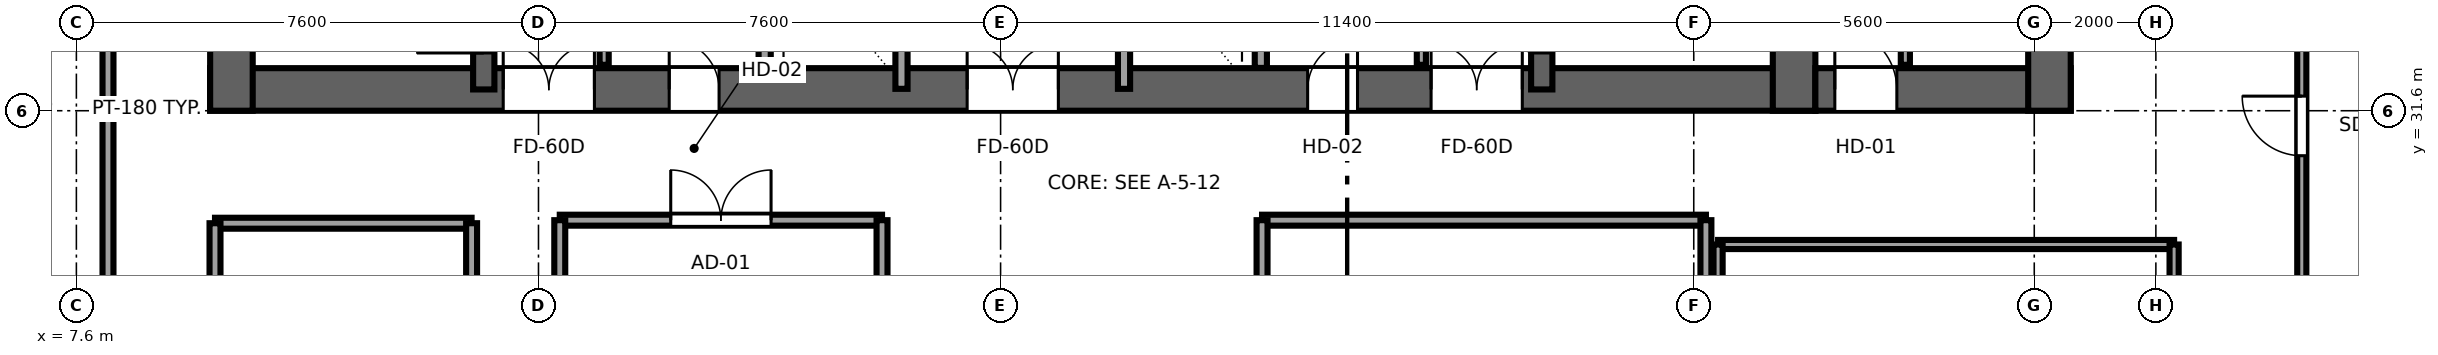
"""IFC4 building model, lengths in metres.
Left out: names, types, materials, properties, quantities, classifications, styles, units other than length and angle.
Written with IfcOpenShell. Run it as: python <this file> out.ifc"""

import sys

from ifc_helpers import new_model, si_unit, direction, frame, frame_2d, origin, place, context, subcontext, project, spatial, rectangle, extrude, source, transform, mapped, element, fill, save


model = new_model("IFC4")
c1 = context("Model", 3, precision=1e-05, world=origin(), true_north=direction((0.0, 1.0)))
c2 = subcontext(c1, "Body", "Model", "MODEL_VIEW")
j1 = project(units=[si_unit("LENGTHUNIT", "METRE"), si_unit("PLANEANGLEUNIT", "RADIAN")], contexts=[c1])
p1 = place(None, origin())
s1 = spatial("IfcSite", under=j1, at=p1, CompositionType="ELEMENT")
p2 = place(p1, origin())
s2 = spatial("IfcBuilding", under=s1, at=p2, CompositionType="ELEMENT")
p3 = place(p2, frame((0.0, 0.0, 147.05)))
s3 = spatial("IfcBuildingStorey", under=s2, at=p3, CompositionType="ELEMENT", Elevation=147.05)
p4 = place(p3, frame((9.8, 31.95, 0.0), z_axis=(0.0, 0.0, 1.0), x_axis=(1.0, 0.0, 0.0)))
e1 = element("IfcWall", 1, at=p4, inside=s3, PredefinedType="SHEAR", context=c2, shape_type="SweptSolid", body=[
    extrude(rectangle(XDim=26.4, YDim=0.7, at=frame_2d((13.2, 0.0))), origin(), (0.0, 0.0, 1.0), 3.55),
])
p5 = place(p4, frame((6.32, 0.0, 0.0), z_axis=(0.0, 0.0, 1.0), x_axis=(-1.0, 0.0, 0.0)))
e2 = element("IfcOpeningElement", 2, at=p5, cuts=e1, PredefinedType="OPENING", context=c2, shape_type="SweptSolid", body=[
    extrude(rectangle(XDim=1.5, YDim=2.04, at=frame_2d((0.75, 1.02))), frame((0.0, 0.36, 0.0), z_axis=(0.0, -1.0, 0.0), x_axis=(1.0, 0.0, 0.0)), (0.0, 0.0, 1.0), 0.72),
])
p6 = place(p4, frame((13.95, 0.0, 0.0), z_axis=(0.0, 0.0, 1.0), x_axis=(-1.0, 0.0, 0.0)))
e3 = element("IfcOpeningElement", 3, at=p6, cuts=e1, PredefinedType="OPENING", context=c2, shape_type="SweptSolid", body=[
    extrude(rectangle(XDim=1.5, YDim=2.04, at=frame_2d((0.75, 1.02))), frame((0.0, 0.36, 0.0), z_axis=(0.0, -1.0, 0.0), x_axis=(1.0, 0.0, 0.0)), (0.0, 0.0, 1.0), 0.72),
])
p7 = place(p4, frame((21.58, 0.0, 0.0), z_axis=(0.0, 0.0, 1.0), x_axis=(-1.0, 0.0, 0.0)))
e4 = element("IfcOpeningElement", 4, at=p7, cuts=e1, PredefinedType="OPENING", context=c2, shape_type="SweptSolid", body=[
    extrude(rectangle(XDim=1.5, YDim=2.04, at=frame_2d((0.75, 1.02))), frame((0.0, 0.36, 0.0), z_axis=(0.0, -1.0, 0.0), x_axis=(1.0, 0.0, 0.0)), (0.0, 0.0, 1.0), 0.72),
])
p8 = place(p4, frame((8.37, 0.0, 0.0), z_axis=(0.0, 0.0, 1.0), x_axis=(-1.0, 0.0, 0.0)))
e5 = element("IfcOpeningElement", 5, at=p8, cuts=e1, PredefinedType="OPENING", context=c2, shape_type="SweptSolid", body=[
    extrude(rectangle(XDim=0.82, YDim=2.01, at=frame_2d((0.41, 1.005))), frame((0.0, 0.36, 0.0), z_axis=(0.0, -1.0, 0.0), x_axis=(1.0, 0.0, 0.0)), (0.0, 0.0, 1.0), 0.72),
])
p9 = place(p4, frame((18.87, 0.0, 0.0), z_axis=(0.0, 0.0, 1.0), x_axis=(-1.0, 0.0, 0.0)))
e6 = element("IfcOpeningElement", 6, at=p9, cuts=e1, PredefinedType="OPENING", context=c2, shape_type="SweptSolid", body=[
    extrude(rectangle(XDim=0.82, YDim=2.01, at=frame_2d((0.41, 1.005))), frame((0.0, 0.36, 0.0), z_axis=(0.0, -1.0, 0.0), x_axis=(1.0, 0.0, 0.0)), (0.0, 0.0, 1.0), 0.72),
])
for number, where, z_axis, x_axis in (
    (7, (10.15, 31.6, 0.0), (0.0, 0.0, 1.0), (0.0, 1.0, 0.0)),
    (8, (35.85, 31.6, 0.0), (0.0, 0.0, 1.0), (0.0, 1.0, 0.0)),
):
    element("IfcWall", number, at=place(p3, frame(where, z_axis=z_axis, x_axis=x_axis)), inside=s3, PredefinedType="SHEAR", context=c2, shape_type="SweptSolid", body=[
        extrude(rectangle(XDim=13.6, YDim=0.7, at=frame_2d((6.8, 0.0))), origin(), (0.0, 0.0, 1.0), 3.55),
    ])
p10 = place(p3, frame((14.3, 31.95, 0.0), z_axis=(0.0, 0.0, 1.0), x_axis=(0.0, 1.0, 0.0)))
e9 = element("IfcWall", 9, at=p10, inside=s3, PredefinedType="SHEAR", context=c2, shape_type="SweptSolid", body=[
    extrude(rectangle(XDim=12.9, YDim=0.35, at=frame_2d((6.45, 0.0))), origin(), (0.0, 0.0, 1.0), 3.55),
])
p11 = place(p10, frame((0.6, 0.0, 0.0)))
e10 = element("IfcOpeningElement", 10, at=p11, cuts=e9, PredefinedType="OPENING", context=c2, shape_type="SweptSolid", body=[
    extrude(rectangle(XDim=1.1, YDim=2.12, at=frame_2d((0.55, 1.06))), frame((0.0, 0.185, 0.0), z_axis=(0.0, -1.0, 0.0), x_axis=(1.0, 0.0, 0.0)), (0.0, 0.0, 1.0), 0.37),
])
p12 = place(p3, frame((31.7, 31.95, 0.0), z_axis=(0.0, 0.0, 1.0), x_axis=(0.0, 1.0, 0.0)))
e11 = element("IfcWall", 11, at=p12, inside=s3, PredefinedType="SHEAR", context=c2, shape_type="SweptSolid", body=[
    extrude(rectangle(XDim=12.9, YDim=0.35, at=frame_2d((6.45, 0.0))), origin(), (0.0, 0.0, 1.0), 3.55),
])
p13 = place(p12, frame((1.7, 0.0, 0.0), z_axis=(0.0, 0.0, 1.0), x_axis=(-1.0, 0.0, 0.0)))
e12 = element("IfcOpeningElement", 12, at=p13, cuts=e11, PredefinedType="OPENING", context=c2, shape_type="SweptSolid", body=[
    extrude(rectangle(XDim=1.1, YDim=2.12, at=frame_2d((0.55, 1.06))), frame((0.0, 0.185, 0.0), z_axis=(0.0, -1.0, 0.0), x_axis=(1.0, 0.0, 0.0)), (0.0, 0.0, 1.0), 0.37),
])
p14 = place(p3, frame((36.2, 31.95, 0.0), z_axis=(0.0, 0.0, 1.0), x_axis=(1.0, 0.0, 0.0)))
e13 = element("IfcWall", 13, at=p14, inside=s3, PredefinedType="SHEAR", context=c2, shape_type="SweptSolid", body=[
    extrude(rectangle(XDim=4.2, YDim=0.7, at=frame_2d((2.1, 0.0))), origin(), (0.0, 0.0, 1.0), 3.55),
])
p15 = place(p14, frame((1.34, 0.0, 0.0), z_axis=(0.0, 0.0, 1.0), x_axis=(-1.0, 0.0, 0.0)))
e14 = element("IfcOpeningElement", 14, at=p15, cuts=e13, PredefinedType="OPENING", context=c2, shape_type="SweptSolid", body=[
    extrude(rectangle(XDim=1.02, YDim=2.03, at=frame_2d((0.51, 1.015))), frame((0.0, 0.36, 0.0), z_axis=(0.0, -1.0, 0.0), x_axis=(1.0, 0.0, 0.0)), (0.0, 0.0, 1.0), 0.72),
])
p16 = place(p3, frame((40.05, 31.6, 0.0), z_axis=(0.0, 0.0, 1.0), x_axis=(0.0, 1.0, 0.0)))
e15 = element("IfcWall", 15, at=p16, inside=s3, PredefinedType="SHEAR", context=c2, shape_type="SweptSolid", body=[
    extrude(rectangle(XDim=13.6, YDim=0.7, at=frame_2d((6.8, 0.0))), origin(), (0.0, 0.0, 1.0), 3.55),
])
for number, where, z_axis, x_axis in (
    (16, (18.92, 32.304, 0.0), (0.0, 0.0, 1.0), (0.0, 1.0, 0.0)),
    (17, (27.08, 32.304, 0.0), (0.0, 0.0, 1.0), (0.0, 1.0, 0.0)),
):
    element("IfcWall", number, at=place(p3, frame(where, z_axis=z_axis, x_axis=x_axis)), inside=s3, PredefinedType="SOLIDWALL", context=c2, shape_type="SweptSolid", body=[
        extrude(rectangle(XDim=3.846, YDim=0.2, at=frame_2d((1.923, 0.0))), origin(), (0.0, 0.0, 1.0), 3.37),
    ])
p17 = place(p3, frame((21.17, 31.96, 0.0), z_axis=(0.0, 0.0, 1.0), x_axis=(0.0, 1.0, 0.0)))
e18 = element("IfcWall", 18, at=p17, inside=s3, PredefinedType="SOLIDWALL", context=c2, shape_type="SweptSolid", body=[
    extrude(rectangle(XDim=12.58, YDim=0.2, at=frame_2d((6.29, 0.0))), origin(), (0.0, 0.0, 1.0), 3.37),
])
p18 = place(p17, frame((5.74, 0.0, 0.0)))
e19 = element("IfcOpeningElement", 19, at=p18, cuts=e18, PredefinedType="OPENING", context=c2, shape_type="SweptSolid", body=[
    extrude(rectangle(XDim=1.1, YDim=2.12, at=frame_2d((0.55, 1.06))), frame((0.0, 0.11, 0.0), z_axis=(0.0, -1.0, 0.0), x_axis=(1.0, 0.0, 0.0)), (0.0, 0.0, 1.0), 0.22),
])
p19 = place(p17, frame((8.24, 0.0, 0.0)))
e20 = element("IfcOpeningElement", 20, at=p19, cuts=e18, PredefinedType="OPENING", context=c2, shape_type="SweptSolid", body=[
    extrude(rectangle(XDim=1.1, YDim=2.12, at=frame_2d((0.55, 1.06))), frame((0.0, 0.11, 0.0), z_axis=(0.0, -1.0, 0.0), x_axis=(1.0, 0.0, 0.0)), (0.0, 0.0, 1.0), 0.22),
])
p20 = place(p3, frame((24.83, 31.96, 0.0), z_axis=(0.0, 0.0, 1.0), x_axis=(0.0, 1.0, 0.0)))
e21 = element("IfcWall", 21, at=p20, inside=s3, PredefinedType="SOLIDWALL", context=c2, shape_type="SweptSolid", body=[
    extrude(rectangle(XDim=12.58, YDim=0.2, at=frame_2d((6.29, 0.0))), origin(), (0.0, 0.0, 1.0), 3.37),
])
p21 = place(p20, frame((5.74, 0.0, 0.0)))
e22 = element("IfcOpeningElement", 22, at=p21, cuts=e21, PredefinedType="OPENING", context=c2, shape_type="SweptSolid", body=[
    extrude(rectangle(XDim=1.1, YDim=2.12, at=frame_2d((0.55, 1.06))), frame((0.0, 0.11, 0.0), z_axis=(0.0, -1.0, 0.0), x_axis=(1.0, 0.0, 0.0)), (0.0, 0.0, 1.0), 0.22),
])
p22 = place(p20, frame((8.24, 0.0, 0.0)))
e23 = element("IfcOpeningElement", 23, at=p22, cuts=e21, PredefinedType="OPENING", context=c2, shape_type="SweptSolid", body=[
    extrude(rectangle(XDim=1.1, YDim=2.12, at=frame_2d((0.55, 1.06))), frame((0.0, 0.11, 0.0), z_axis=(0.0, -1.0, 0.0), x_axis=(1.0, 0.0, 0.0)), (0.0, 0.0, 1.0), 0.22),
])
for number, where, z_axis, x_axis in (
    (24, (16.28, 32.355, 0.0), (0.0, 0.0, 1.0), (0.0, 1.0, 0.0)),
    (25, (29.72, 32.355, 0.0), (0.0, 0.0, 1.0), (0.0, 1.0, 0.0)),
):
    element("IfcWall", number, at=place(p3, frame(where, z_axis=z_axis, x_axis=x_axis)), inside=s3, PredefinedType="PARTITIONING", context=c2, shape_type="SweptSolid", body=[
        extrude(rectangle(XDim=0.865, YDim=0.15, at=frame_2d((0.433, 0.0))), origin(), (0.0, 0.0, 1.0), 3.37),
    ])
p23 = place(p3, frame((37.68, 32.355, 0.0), z_axis=(0.0, 0.0, 1.0), x_axis=(0.0, 1.0, 0.0)))
e26 = element("IfcWall", 26, at=p23, inside=s3, PredefinedType="PARTITIONING", context=c2, shape_type="SweptSolid", body=[
    extrude(rectangle(XDim=7.845, YDim=0.15, at=frame_2d((3.922, 0.0))), origin(), (0.0, 0.0, 1.0), 3.37),
])
p24 = place(p23, frame((3.413, 0.0, 0.0)))
e27 = element("IfcOpeningElement", 27, at=p24, cuts=e26, PredefinedType="OPENING", context=c2, shape_type="SweptSolid", body=[
    extrude(rectangle(XDim=1.02, YDim=2.03, at=frame_2d((0.51, 1.015))), frame((0.0, 0.085, 0.0), z_axis=(0.0, -1.0, 0.0), x_axis=(1.0, 0.0, 0.0)), (0.0, 0.0, 1.0), 0.17),
])
p25 = place(p3, frame((8.12, 21.1, 0.0), z_axis=(0.0, 0.0, 1.0), x_axis=(0.0, 1.0, 0.0)))
e28 = element("IfcWall", 28, at=p25, inside=s3, PredefinedType="PARTITIONING", context=c2, shape_type="SweptSolid", body=[
    extrude(rectangle(XDim=14.7, YDim=0.18, at=frame_2d((7.35, 0.0))), origin(), (0.0, 0.0, 1.0), 3.37),
])
p26 = place(p25, frame((4.7, 0.0, 0.0)))
e29 = element("IfcOpeningElement", 29, at=p26, cuts=e28, PredefinedType="OPENING", context=c2, shape_type="SweptSolid", body=[
    extrude(rectangle(XDim=1.65, YDim=2.15, at=frame_2d((0.825, 1.075))), frame((0.0, 0.1, 0.0), z_axis=(0.0, -1.0, 0.0), x_axis=(1.0, 0.0, 0.0)), (0.0, 0.0, 1.0), 0.2),
])
p27 = place(p3, frame((44.2, 25.18, 0.0), z_axis=(0.0, 0.0, 1.0), x_axis=(0.0, 1.0, 0.0)))
e30 = element("IfcWall", 30, at=p27, inside=s3, PredefinedType="PARTITIONING", context=c2, shape_type="SweptSolid", body=[
    extrude(rectangle(XDim=12.34, YDim=0.15, at=frame_2d((6.17, 0.0))), origin(), (0.0, 0.0, 1.0), 3.37),
])
p28 = place(p27, frame((5.68, 0.0, 0.0)))
e31 = element("IfcOpeningElement", 31, at=p28, cuts=e30, PredefinedType="OPENING", context=c2, shape_type="SweptSolid", body=[
    extrude(rectangle(XDim=0.98, YDim=2.12, at=frame_2d((0.49, 1.06))), frame((0.0, 0.085, 0.0), z_axis=(0.0, -1.0, 0.0), x_axis=(1.0, 0.0, 0.0)), (0.0, 0.0, 1.0), 0.17),
])
p29 = place(p3, frame((9.88, 29.75, 0.0), z_axis=(0.0, 0.0, 1.0), x_axis=(1.0, 0.0, 0.0)))
e32 = element("IfcWall", 32, at=p29, inside=s3, PredefinedType="PARTITIONING", context=c2, shape_type="SweptSolid", body=[
    extrude(rectangle(XDim=4.22, YDim=0.18, at=frame_2d((2.11, 0.0))), origin(), (0.0, 0.0, 1.0), 3.37),
])
for number, where, z_axis, x_axis in (
    (33, (9.88, 21.1, 0.0), (0.0, 0.0, 1.0), (0.0, 1.0, 0.0)),
    (34, (14.1, 21.1, 0.0), (0.0, 0.0, 1.0), (0.0, 1.0, 0.0)),
):
    element("IfcWall", number, at=place(p3, frame(where, z_axis=z_axis, x_axis=x_axis)), inside=s3, PredefinedType="PARTITIONING", context=c2, shape_type="SweptSolid", body=[
        extrude(rectangle(XDim=8.65, YDim=0.18, at=frame_2d((4.325, 0.0))), origin(), (0.0, 0.0, 1.0), 3.37),
    ])
p30 = place(p3, frame((27.1, 29.8, 0.0), z_axis=(0.0, 0.0, 1.0), x_axis=(1.0, 0.0, 0.0)))
e35 = element("IfcWall", 35, at=p30, inside=s3, PredefinedType="PARTITIONING", context=c2, shape_type="SweptSolid", body=[
    extrude(rectangle(XDim=7.3, YDim=0.18, at=frame_2d((3.65, 0.0))), origin(), (0.0, 0.0, 1.0), 3.37),
])
for number, where, z_axis, x_axis in (
    (36, (27.1, 21.1, 0.0), (0.0, 0.0, 1.0), (0.0, 1.0, 0.0)),
    (37, (34.4, 21.1, 0.0), (0.0, 0.0, 1.0), (0.0, 1.0, 0.0)),
):
    element("IfcWall", number, at=place(p3, frame(where, z_axis=z_axis, x_axis=x_axis)), inside=s3, PredefinedType="PARTITIONING", context=c2, shape_type="SweptSolid", body=[
        extrude(rectangle(XDim=8.7, YDim=0.18, at=frame_2d((4.35, 0.0))), origin(), (0.0, 0.0, 1.0), 3.37),
    ])
p31 = place(p3, frame((15.55, 29.8, 0.0), z_axis=(0.0, 0.0, 1.0), x_axis=(1.0, 0.0, 0.0)))
e38 = element("IfcWall", 38, at=p31, inside=s3, PredefinedType="PARTITIONING", context=c2, shape_type="SweptSolid", body=[
    extrude(rectangle(XDim=5.3, YDim=0.18, at=frame_2d((2.65, 0.0))), origin(), (0.0, 0.0, 1.0), 3.37),
])
p32 = place(p31, frame((1.825, 0.0, 0.0)))
e39 = element("IfcOpeningElement", 39, at=p32, cuts=e38, PredefinedType="OPENING", context=c2, shape_type="SweptSolid", body=[
    extrude(rectangle(XDim=1.65, YDim=2.15, at=frame_2d((0.825, 1.075))), frame((0.0, 0.1, 0.0), z_axis=(0.0, -1.0, 0.0), x_axis=(1.0, 0.0, 0.0)), (0.0, 0.0, 1.0), 0.2),
])
for number, where, z_axis, x_axis in (
    (40, (15.55, 24.92, 0.0), (0.0, 0.0, 1.0), (0.0, 1.0, 0.0)),
    (41, (20.85, 24.92, 0.0), (0.0, 0.0, 1.0), (0.0, 1.0, 0.0)),
):
    element("IfcWall", number, at=place(p3, frame(where, z_axis=z_axis, x_axis=x_axis)), inside=s3, PredefinedType="PARTITIONING", context=c2, shape_type="SweptSolid", body=[
        extrude(rectangle(XDim=4.88, YDim=0.18, at=frame_2d((2.44, 0.0))), origin(), (0.0, 0.0, 1.0), 3.37),
    ])
p33 = place(p3, frame((34.6, 29.4, 0.0), z_axis=(0.0, 0.0, 1.0), x_axis=(1.0, 0.0, 0.0)))
e42 = element("IfcWall", 42, at=p33, inside=s3, PredefinedType="PARTITIONING", context=c2, shape_type="SweptSolid", body=[
    extrude(rectangle(XDim=7.5, YDim=0.15, at=frame_2d((3.75, 0.0))), origin(), (0.0, 0.0, 1.0), 2.16),
])
p34 = place(p3, frame((34.6, 21.1, 0.0), z_axis=(0.0, 0.0, 1.0), x_axis=(0.0, 1.0, 0.0)))
e43 = element("IfcWall", 43, at=p34, inside=s3, PredefinedType="PARTITIONING", context=c2, shape_type="SweptSolid", body=[
    extrude(rectangle(XDim=8.3, YDim=0.15, at=frame_2d((4.15, 0.0))), origin(), (0.0, 0.0, 1.0), 3.37),
])
p35 = place(p3, frame((42.1, 21.1, 0.0), z_axis=(0.0, 0.0, 1.0), x_axis=(0.0, 1.0, 0.0)))
e44 = element("IfcWall", 44, at=p35, inside=s3, PredefinedType="PARTITIONING", context=c2, shape_type="SweptSolid", body=[
    extrude(rectangle(XDim=8.3, YDim=0.15, at=frame_2d((4.15, 0.0))), origin(), (0.0, 0.0, 1.0), 2.16),
])
m1 = source(origin(), c2, "Body", "SweptSolid", [
    extrude(rectangle(XDim=1.1, YDim=2.12, at=frame_2d((0.55, 1.06))), frame((0.0, 0.025, 0.0), z_axis=(0.0, -1.0, 0.0), x_axis=(1.0, 0.0, 0.0)), (0.0, 0.0, 1.0), 0.05),
])
p36 = place(p11, origin())
e45 = element("IfcDoor", 45, at=p36, inside=s3, OperationType="SINGLE_SWING_LEFT", PredefinedType="DOOR", context=c2, shape_type="MappedRepresentation", body=[
    mapped(m1, transform((0.0, 0.0, 0.0), x_axis=(1.0, 0.0, 0.0), y_axis=(0.0, 1.0, 0.0), z_axis=(0.0, 0.0, 1.0), scale=1.0)),
])
fill(e10, e45)
p37 = place(p13, origin())
e46 = element("IfcDoor", 46, at=p37, inside=s3, OperationType="SINGLE_SWING_RIGHT", PredefinedType="DOOR", context=c2, shape_type="MappedRepresentation", body=[
    mapped(m1, transform((0.0, 0.0, 0.0), x_axis=(1.0, 0.0, 0.0), y_axis=(0.0, 1.0, 0.0), z_axis=(0.0, 0.0, 1.0), scale=1.0)),
])
fill(e12, e46)
m2 = source(origin(), c2, "Body", "SweptSolid", [
    extrude(rectangle(XDim=1.5, YDim=2.04, at=frame_2d((0.75, 1.02))), frame((0.0, 0.025, 0.0), z_axis=(0.0, -1.0, 0.0), x_axis=(1.0, 0.0, 0.0)), (0.0, 0.0, 1.0), 0.05),
])
p38 = place(p5, origin())
e47 = element("IfcDoor", 47, at=p38, inside=s3, OperationType="DOUBLE_DOOR_SINGLE_SWING", PredefinedType="DOOR", context=c2, shape_type="MappedRepresentation", body=[
    mapped(m2, transform((0.0, 0.0, 0.0), x_axis=(1.0, 0.0, 0.0), y_axis=(0.0, 1.0, 0.0), z_axis=(0.0, 0.0, 1.0), scale=1.0)),
])
fill(e2, e47)
p39 = place(p6, origin())
e48 = element("IfcDoor", 48, at=p39, inside=s3, OperationType="DOUBLE_DOOR_SINGLE_SWING", PredefinedType="DOOR", context=c2, shape_type="MappedRepresentation", body=[
    mapped(m2, transform((0.0, 0.0, 0.0), x_axis=(1.0, 0.0, 0.0), y_axis=(0.0, 1.0, 0.0), z_axis=(0.0, 0.0, 1.0), scale=1.0)),
])
fill(e3, e48)
p40 = place(p7, origin())
e49 = element("IfcDoor", 49, at=p40, inside=s3, OperationType="DOUBLE_DOOR_SINGLE_SWING", PredefinedType="DOOR", context=c2, shape_type="MappedRepresentation", body=[
    mapped(m2, transform((0.0, 0.0, 0.0), x_axis=(1.0, 0.0, 0.0), y_axis=(0.0, 1.0, 0.0), z_axis=(0.0, 0.0, 1.0), scale=1.0)),
])
fill(e4, e49)
m3 = source(origin(), c2, "Body", "SweptSolid", [
    extrude(rectangle(XDim=0.82, YDim=2.01, at=frame_2d((0.41, 1.005))), frame((0.0, 0.025, 0.0), z_axis=(0.0, -1.0, 0.0), x_axis=(1.0, 0.0, 0.0)), (0.0, 0.0, 1.0), 0.05),
])
p41 = place(p8, origin())
e50 = element("IfcDoor", 50, at=p41, inside=s3, OperationType="SINGLE_SWING_LEFT", PredefinedType="DOOR", context=c2, shape_type="MappedRepresentation", body=[
    mapped(m3, transform((0.0, 0.0, 0.0), x_axis=(1.0, 0.0, 0.0), y_axis=(0.0, 1.0, 0.0), z_axis=(0.0, 0.0, 1.0), scale=1.0)),
])
fill(e5, e50)
p42 = place(p9, origin())
e51 = element("IfcDoor", 51, at=p42, inside=s3, OperationType="SINGLE_SWING_RIGHT", PredefinedType="DOOR", context=c2, shape_type="MappedRepresentation", body=[
    mapped(m3, transform((0.0, 0.0, 0.0), x_axis=(1.0, 0.0, 0.0), y_axis=(0.0, 1.0, 0.0), z_axis=(0.0, 0.0, 1.0), scale=1.0)),
])
fill(e6, e51)
m4 = source(origin(), c2, "Body", "SweptSolid", [
    extrude(rectangle(XDim=1.02, YDim=2.03, at=frame_2d((0.51, 1.015))), frame((0.0, 0.025, 0.0), z_axis=(0.0, -1.0, 0.0), x_axis=(1.0, 0.0, 0.0)), (0.0, 0.0, 1.0), 0.05),
])
p43 = place(p15, origin())
e52 = element("IfcDoor", 52, at=p43, inside=s3, OperationType="SINGLE_SWING_LEFT", PredefinedType="DOOR", context=c2, shape_type="MappedRepresentation", body=[
    mapped(m4, transform((0.0, 0.0, 0.0), x_axis=(1.0, 0.0, 0.0), y_axis=(0.0, 1.0, 0.0), z_axis=(0.0, 0.0, 1.0), scale=1.0)),
])
fill(e14, e52)
m5 = source(origin(), c2, "Body", "SweptSolid", [
    extrude(rectangle(XDim=0.98, YDim=2.12, at=frame_2d((0.49, 1.06))), frame((0.0, 0.025, 0.0), z_axis=(0.0, -1.0, 0.0), x_axis=(1.0, 0.0, 0.0)), (0.0, 0.0, 1.0), 0.05),
])
p44 = place(p28, origin())
e53 = element("IfcDoor", 53, at=p44, inside=s3, OperationType="SINGLE_SWING_RIGHT", PredefinedType="DOOR", context=c2, shape_type="MappedRepresentation", body=[
    mapped(m5, transform((0.0, 0.0, 0.0), x_axis=(1.0, 0.0, 0.0), y_axis=(0.0, 1.0, 0.0), z_axis=(0.0, 0.0, 1.0), scale=1.0)),
])
fill(e31, e53)
m6 = source(origin(), c2, "Body", "SweptSolid", [
    extrude(rectangle(XDim=1.65, YDim=2.15, at=frame_2d((0.825, 1.075))), frame((0.0, 0.025, 0.0), z_axis=(0.0, -1.0, 0.0), x_axis=(1.0, 0.0, 0.0)), (0.0, 0.0, 1.0), 0.05),
])
p45 = place(p32, origin())
e54 = element("IfcDoor", 54, at=p45, inside=s3, OperationType="DOUBLE_DOOR_SINGLE_SWING", PredefinedType="DOOR", context=c2, shape_type="MappedRepresentation", body=[
    mapped(m6, transform((0.0, 0.0, 0.0), x_axis=(1.0, 0.0, 0.0), y_axis=(0.0, 1.0, 0.0), z_axis=(0.0, 0.0, 1.0), scale=1.0)),
])
fill(e39, e54)
save(model, sys.argv[1])
